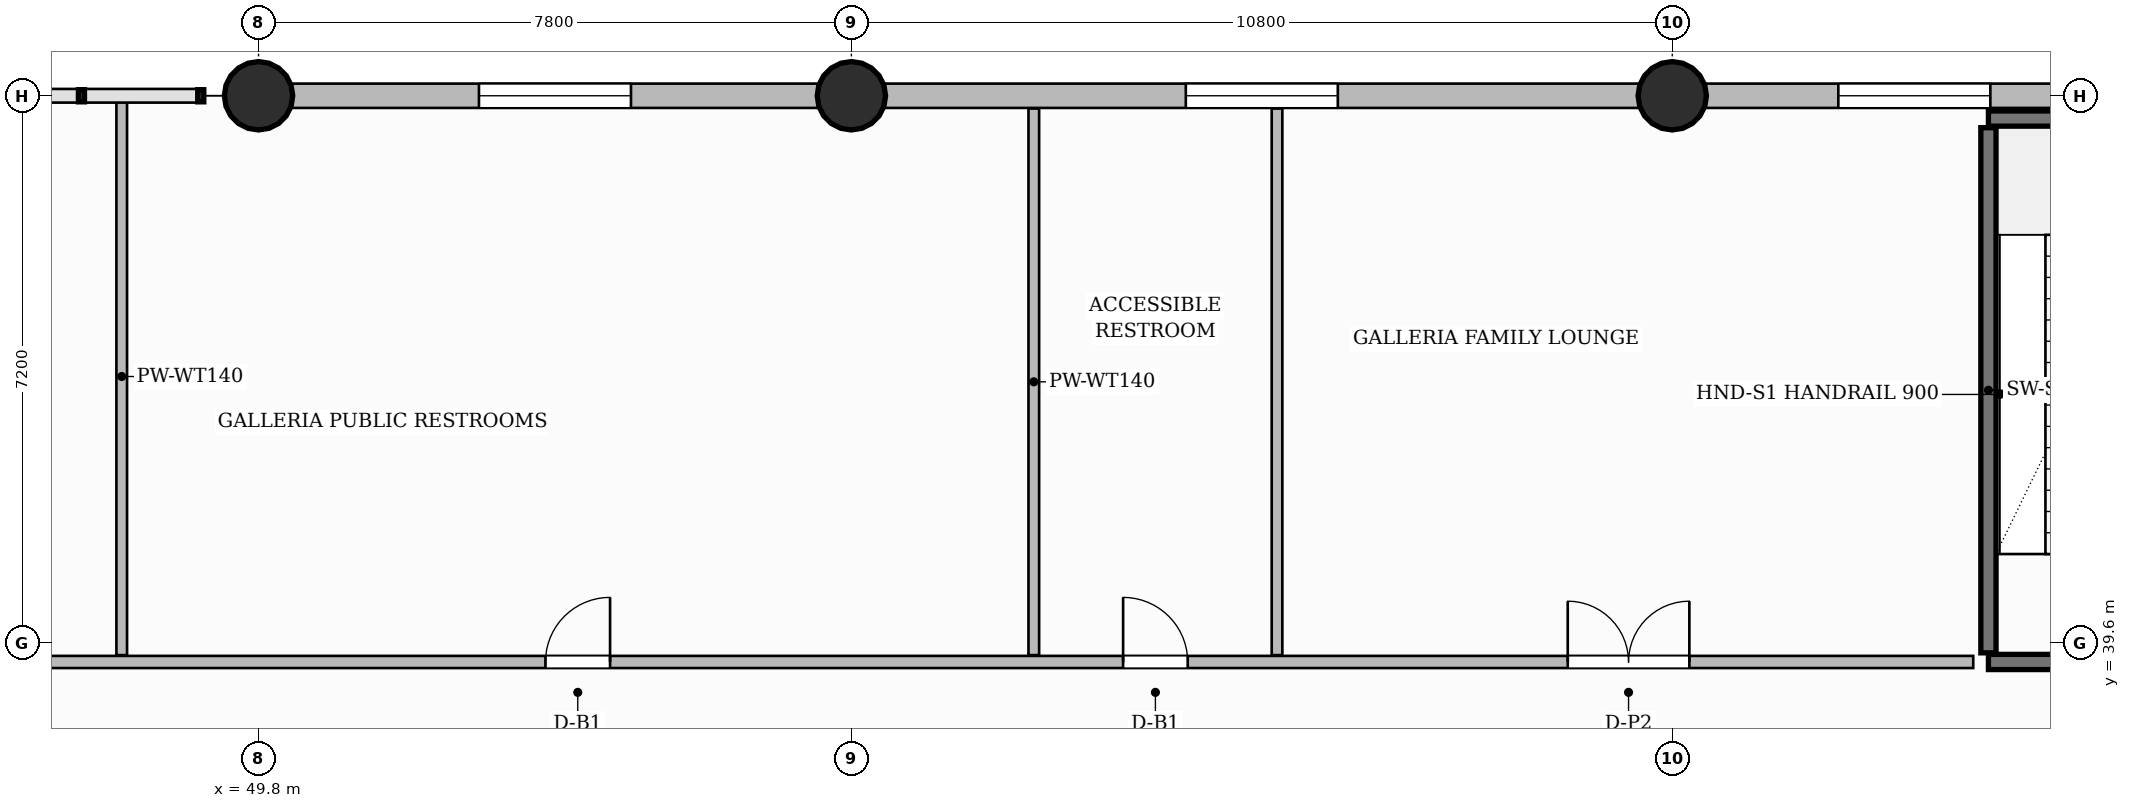
"""IFC4 building model, lengths in metres.
Left out: names, types, materials, properties, quantities, classifications, styles, units other than length and angle.
Written with IfcOpenShell. Run it as: python <this file> out.ifc"""

import sys

from ifc_helpers import new_model, si_unit, direction, frame, frame_2d, origin, origin_2d, place, context, subcontext, project, spatial, rectangle, circle, extrude, source, transform, mapped, element, fill, save


model = new_model("IFC4")
c1 = context("Model", 3, precision=1e-05, world=origin(), true_north=direction((0.0, 1.0)))
c2 = subcontext(c1, "Body", "Model", "MODEL_VIEW")
j1 = project(units=[si_unit("LENGTHUNIT", "METRE"), si_unit("PLANEANGLEUNIT", "RADIAN")], contexts=[c1])
p1 = place(None, origin())
s1 = spatial("IfcSite", under=j1, at=p1, CompositionType="ELEMENT")
p2 = place(p1, origin())
s2 = spatial("IfcBuilding", under=s1, at=p2, CompositionType="ELEMENT")
p3 = place(p2, frame((0.0, 0.0, 5.4)))
s3 = spatial("IfcBuildingStorey", under=s2, at=p3, CompositionType="ELEMENT", Elevation=5.4)
m1 = source(origin(), c2, "Body", "SweptSolid", [
    extrude(circle(Radius=0.45, at=origin_2d()), origin(), (0.0, 0.0, 1.0), 5.4),
])
for number, where, z_axis, x_axis in (
    (1, (49.8, 46.8, 0.0), (0.0, 0.0, 1.0), (1.0, 0.0, 0.0)),
    (2, (57.6, 46.8, 0.0), (0.0, 0.0, 1.0), (1.0, 0.0, 0.0)),
    (3, (68.4, 46.8, 0.0), (0.0, 0.0, 1.0), (1.0, 0.0, 0.0)),
):
    element("IfcColumn", number, at=place(p3, frame(where, z_axis=z_axis, x_axis=x_axis)), inside=s3, PredefinedType="COLUMN", context=c2, shape_type="MappedRepresentation", body=[
        mapped(m1, transform((0.0, 0.0, 0.0), scale=1.0)),
    ])
p4 = place(p3, frame((72.56, 39.47, 0.0), z_axis=(0.0, 0.0, 1.0), x_axis=(0.0, 1.0, 0.0)))
e4 = element("IfcWall", 4, at=p4, inside=s3, PredefinedType="SHEAR", context=c2, shape_type="SweptSolid", body=[
    extrude(rectangle(XDim=6.91, YDim=0.2, at=frame_2d((3.455, 0.0))), origin(), (0.0, 0.0, 1.0), 5.4),
])
p5 = place(p3, frame((72.56, 46.5, 0.0), z_axis=(0.0, 0.0, 1.0), x_axis=(1.0, 0.0, 0.0)))
e5 = element("IfcWall", 5, at=p5, inside=s3, PredefinedType="SHEAR", context=c2, shape_type="SweptSolid", body=[
    extrude(rectangle(XDim=2.94, YDim=0.2, at=frame_2d((1.47, 0.0))), origin(), (0.0, 0.0, 1.0), 5.4),
])
p6 = place(p3, frame((72.56, 39.35, 0.0), z_axis=(0.0, 0.0, 1.0), x_axis=(1.0, 0.0, 0.0)))
e6 = element("IfcWall", 6, at=p6, inside=s3, PredefinedType="SHEAR", context=c2, shape_type="SweptSolid", body=[
    extrude(rectangle(XDim=2.94, YDim=0.2, at=frame_2d((1.47, 0.0))), origin(), (0.0, 0.0, 1.0), 5.4),
])
p7 = place(p6, frame((0.985, 0.0, 0.0)))
e7 = element("IfcOpeningElement", 7, at=p7, cuts=e6, PredefinedType="OPENING", context=c2, shape_type="SweptSolid", body=[
    extrude(rectangle(XDim=1.05, YDim=2.2, at=frame_2d((0.525, 1.1))), frame((0.0, 0.11, 0.0), z_axis=(0.0, -1.0, 0.0), x_axis=(1.0, 0.0, 0.0)), (0.0, 0.0, 1.0), 0.22),
])
p8 = place(p3, frame((28.64, 39.35, 0.0), z_axis=(0.0, 0.0, 1.0), x_axis=(1.0, 0.0, 0.0)))
e8 = element("IfcWall", 8, at=p8, inside=s3, PredefinedType="PARTITIONING", context=c2, shape_type="SweptSolid", body=[
    extrude(rectangle(XDim=43.72, YDim=0.16, at=frame_2d((21.86, 0.0))), origin(), (0.0, 0.0, 1.0), 4.185),
])
p9 = place(p8, frame((8.835, 0.0, 0.0)))
e9 = element("IfcOpeningElement", 9, at=p9, cuts=e8, PredefinedType="OPENING", context=c2, shape_type="SweptSolid", body=[
    extrude(rectangle(XDim=1.6, YDim=2.4, at=frame_2d((0.8, 1.2))), frame((0.0, 0.09, 0.0), z_axis=(0.0, -1.0, 0.0), x_axis=(1.0, 0.0, 0.0)), (0.0, 0.0, 1.0), 0.18),
])
p10 = place(p8, frame((24.935, 0.0, 0.0)))
e10 = element("IfcOpeningElement", 10, at=p10, cuts=e8, PredefinedType="OPENING", context=c2, shape_type="SweptSolid", body=[
    extrude(rectangle(XDim=0.85, YDim=2.1, at=frame_2d((0.425, 1.05))), frame((0.0, 0.09, 0.0), z_axis=(0.0, -1.0, 0.0), x_axis=(1.0, 0.0, 0.0)), (0.0, 0.0, 1.0), 0.18),
])
p11 = place(p8, frame((32.535, 0.0, 0.0)))
e11 = element("IfcOpeningElement", 11, at=p11, cuts=e8, PredefinedType="OPENING", context=c2, shape_type="SweptSolid", body=[
    extrude(rectangle(XDim=0.85, YDim=2.1, at=frame_2d((0.425, 1.05))), frame((0.0, 0.09, 0.0), z_axis=(0.0, -1.0, 0.0), x_axis=(1.0, 0.0, 0.0)), (0.0, 0.0, 1.0), 0.18),
])
p12 = place(p8, frame((38.385, 0.0, 0.0)))
e12 = element("IfcOpeningElement", 12, at=p12, cuts=e8, PredefinedType="OPENING", context=c2, shape_type="SweptSolid", body=[
    extrude(rectangle(XDim=1.6, YDim=2.4, at=frame_2d((0.8, 1.2))), frame((0.0, 0.09, 0.0), z_axis=(0.0, -1.0, 0.0), x_axis=(1.0, 0.0, 0.0)), (0.0, 0.0, 1.0), 0.18),
])
p13 = place(p3, frame((48.0, 39.44, 0.0), z_axis=(0.0, 0.0, 1.0), x_axis=(0.0, 1.0, 0.0)))
e13 = element("IfcWall", 13, at=p13, inside=s3, PredefinedType="PARTITIONING", context=c2, shape_type="SweptSolid", body=[
    extrude(rectangle(XDim=7.332, YDim=0.14, at=frame_2d((3.666, 0.0))), origin(), (0.0, 0.0, 1.0), 5.1),
])
for number, where, z_axis, x_axis in (
    (14, (60.0, 39.44, 0.0), (0.0, 0.0, 1.0), (0.0, 1.0, 0.0)),
    (15, (63.2, 39.44, 0.0), (0.0, 0.0, 1.0), (0.0, 1.0, 0.0)),
):
    element("IfcWall", number, at=place(p3, frame(where, z_axis=z_axis, x_axis=x_axis)), inside=s3, PredefinedType="PARTITIONING", context=c2, shape_type="SweptSolid", body=[
        extrude(rectangle(XDim=7.192, YDim=0.14, at=frame_2d((3.596, 0.0))), origin(), (0.0, 0.0, 1.0), 5.1),
    ])
p14 = place(p3, frame((49.8, 46.8, 0.0), z_axis=(0.0, 0.0, 1.0), x_axis=(1.0, 0.0, 0.0)))
e16 = element("IfcWall", 16, at=p14, inside=s3, PredefinedType="SOLIDWALL", context=c2, shape_type="SweptSolid", body=[
    extrude(rectangle(XDim=30.6, YDim=0.32, at=frame_2d((15.3, 0.0))), origin(), (0.0, 0.0, 1.0), 4.185),
])
p15 = place(p14, frame((2.9, 0.0, 0.75)))
e17 = element("IfcOpeningElement", 17, at=p15, cuts=e16, PredefinedType="OPENING", context=c2, shape_type="SweptSolid", body=[
    extrude(rectangle(XDim=2.0, YDim=2.6, at=frame_2d((1.0, 1.3))), frame((0.0, 0.17, 0.0), z_axis=(0.0, -1.0, 0.0), x_axis=(1.0, 0.0, 0.0)), (0.0, 0.0, 1.0), 0.34),
])
p16 = place(p14, frame((12.2, 0.0, 0.75)))
e18 = element("IfcOpeningElement", 18, at=p16, cuts=e16, PredefinedType="OPENING", context=c2, shape_type="SweptSolid", body=[
    extrude(rectangle(XDim=2.0, YDim=2.6, at=frame_2d((1.0, 1.3))), frame((0.0, 0.17, 0.0), z_axis=(0.0, -1.0, 0.0), x_axis=(1.0, 0.0, 0.0)), (0.0, 0.0, 1.0), 0.34),
])
p17 = place(p14, frame((20.785, 0.0, 0.75)))
e19 = element("IfcOpeningElement", 19, at=p17, cuts=e16, PredefinedType="OPENING", context=c2, shape_type="SweptSolid", body=[
    extrude(rectangle(XDim=2.0, YDim=2.6, at=frame_2d((1.0, 1.3))), frame((0.0, 0.17, 0.0), z_axis=(0.0, -1.0, 0.0), x_axis=(1.0, 0.0, 0.0)), (0.0, 0.0, 1.0), 0.34),
])
p18 = place(p14, frame((25.445, 0.0, 0.75)))
e20 = element("IfcOpeningElement", 20, at=p18, cuts=e16, PredefinedType="OPENING", context=c2, shape_type="SweptSolid", body=[
    extrude(rectangle(XDim=2.0, YDim=2.6, at=frame_2d((1.0, 1.3))), frame((0.0, 0.17, 0.0), z_axis=(0.0, -1.0, 0.0), x_axis=(1.0, 0.0, 0.0)), (0.0, 0.0, 1.0), 0.34),
])
m2 = source(origin(), c2, "Body", "SweptSolid", [
    extrude(rectangle(XDim=0.85, YDim=2.1, at=frame_2d((0.425, 1.05))), frame((0.0, 0.025, 0.0), z_axis=(0.0, -1.0, 0.0), x_axis=(1.0, 0.0, 0.0)), (0.0, 0.0, 1.0), 0.05),
])
p19 = place(p10, origin())
e21 = element("IfcDoor", 21, at=p19, inside=s3, OperationType="SINGLE_SWING_RIGHT", PredefinedType="DOOR", context=c2, shape_type="MappedRepresentation", body=[
    mapped(m2, transform((0.0, 0.0, 0.0), scale=1.0)),
])
fill(e10, e21)
p20 = place(p11, origin())
e22 = element("IfcDoor", 22, at=p20, inside=s3, OperationType="SINGLE_SWING_LEFT", PredefinedType="DOOR", context=c2, shape_type="MappedRepresentation", body=[
    mapped(m2, transform((0.0, 0.0, 0.0), scale=1.0)),
])
fill(e11, e22)
m3 = source(origin(), c2, "Body", "SweptSolid", [
    extrude(rectangle(XDim=1.6, YDim=2.4, at=frame_2d((0.8, 1.2))), frame((0.0, 0.025, 0.0), z_axis=(0.0, -1.0, 0.0), x_axis=(1.0, 0.0, 0.0)), (0.0, 0.0, 1.0), 0.05),
])
p21 = place(p12, origin())
e23 = element("IfcDoor", 23, at=p21, inside=s3, OperationType="DOUBLE_DOOR_SINGLE_SWING", PredefinedType="DOOR", context=c2, shape_type="MappedRepresentation", body=[
    mapped(m3, transform((0.0, 0.0, 0.0), scale=1.0)),
])
fill(e12, e23)
m4 = source(origin(), c2, "Body", "SweptSolid", [
    extrude(rectangle(XDim=2.0, YDim=2.6, at=frame_2d((1.0, 1.3))), frame((0.0, 0.03, 0.0), z_axis=(0.0, -1.0, 0.0), x_axis=(1.0, 0.0, 0.0)), (0.0, 0.0, 1.0), 0.06),
])
p22 = place(p15, origin())
e24 = element("IfcWindow", 24, at=p22, inside=s3, PartitioningType="DOUBLE_PANEL_VERTICAL", PredefinedType="WINDOW", context=c2, shape_type="MappedRepresentation", body=[
    mapped(m4, transform((0.0, 0.0, 0.0), scale=1.0)),
])
fill(e17, e24)
p23 = place(p16, origin())
e25 = element("IfcWindow", 25, at=p23, inside=s3, PartitioningType="DOUBLE_PANEL_VERTICAL", PredefinedType="WINDOW", context=c2, shape_type="MappedRepresentation", body=[
    mapped(m4, transform((0.0, 0.0, 0.0), scale=1.0)),
])
fill(e18, e25)
p24 = place(p17, origin())
e26 = element("IfcWindow", 26, at=p24, inside=s3, PartitioningType="DOUBLE_PANEL_VERTICAL", PredefinedType="WINDOW", context=c2, shape_type="MappedRepresentation", body=[
    mapped(m4, transform((0.0, 0.0, 0.0), scale=1.0)),
])
fill(e19, e26)
save(model, sys.argv[1])
